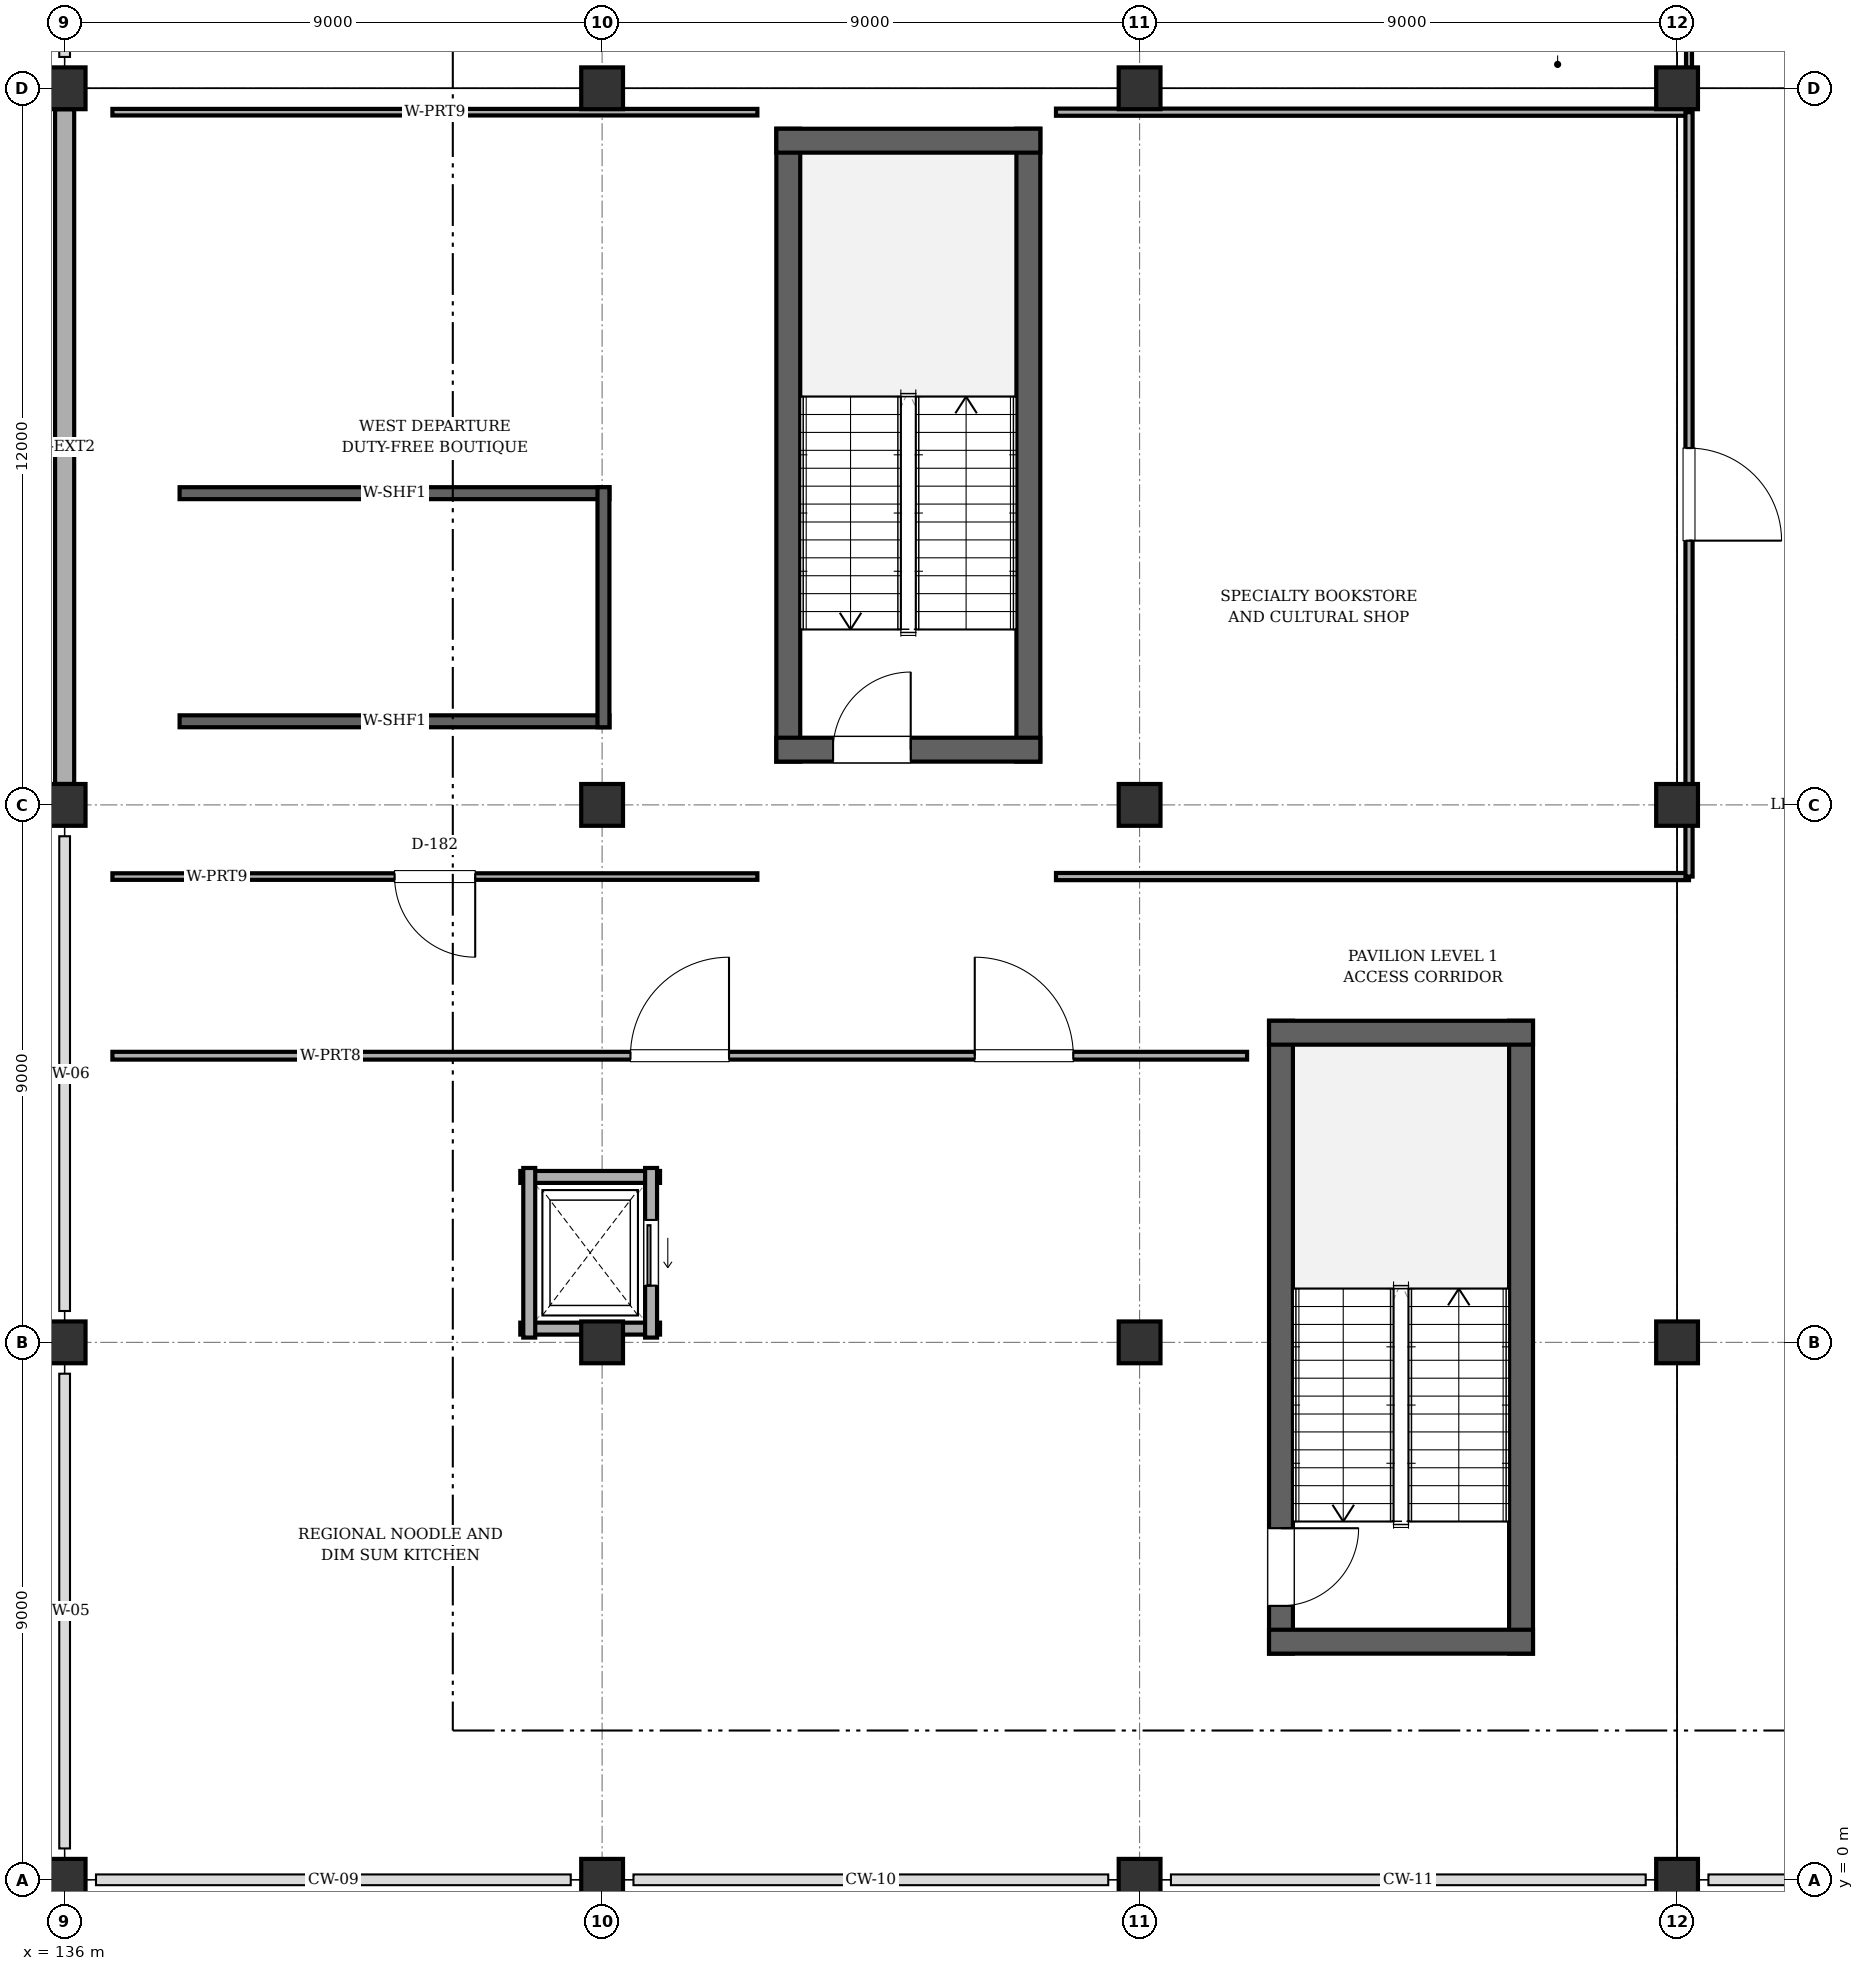
"""IFC4 building model, lengths in metres.
Left out: names, types, materials, properties, quantities, classifications, styles, units other than length and angle.
Written with IfcOpenShell. Run it as: python <this file> out.ifc"""

import sys

from ifc_helpers import new_model, si_unit, direction, frame, frame_2d, origin, origin_2d, place, context, subcontext, project, spatial, rectangle, extrude, element, fill, save


model = new_model("IFC4")
c1 = context("Model", 3, precision=1e-05, world=origin(), true_north=direction((0.0, 1.0)))
c2 = subcontext(c1, "Body", "Model", "MODEL_VIEW")
j1 = project(units=[si_unit("LENGTHUNIT", "METRE"), si_unit("PLANEANGLEUNIT", "RADIAN")], contexts=[c1])
p1 = place(None, origin())
s1 = spatial("IfcSite", under=j1, at=p1, CompositionType="ELEMENT")
p2 = place(p1, origin())
s2 = spatial("IfcBuilding", under=s1, at=p2, CompositionType="ELEMENT")
p3 = place(p2, frame((0.0, 0.0, 6.6)))
s3 = spatial("IfcBuildingStorey", under=s2, at=p3, CompositionType="ELEMENT", Elevation=6.6)
for number, where, z_axis, x_axis in (
    (1, (136.0, 0.0, 0.0), (0.0, 0.0, 1.0), (1.0, 0.0, 0.0)),
    (2, (136.0, 9.0, 0.0), (0.0, 0.0, 1.0), (1.0, 0.0, 0.0)),
    (3, (136.0, 18.0, 0.0), (0.0, 0.0, 1.0), (1.0, 0.0, 0.0)),
    (4, (136.0, 30.0, 0.0), (0.0, 0.0, 1.0), (1.0, 0.0, 0.0)),
    (5, (145.0, 0.0, 0.0), (0.0, 0.0, 1.0), (1.0, 0.0, 0.0)),
    (6, (145.0, 9.0, 0.0), (0.0, 0.0, 1.0), (1.0, 0.0, 0.0)),
    (7, (145.0, 18.0, 0.0), (0.0, 0.0, 1.0), (1.0, 0.0, 0.0)),
    (8, (145.0, 30.0, 0.0), (0.0, 0.0, 1.0), (1.0, 0.0, 0.0)),
    (9, (154.0, 0.0, 0.0), (0.0, 0.0, 1.0), (1.0, 0.0, 0.0)),
    (10, (154.0, 9.0, 0.0), (0.0, 0.0, 1.0), (1.0, 0.0, 0.0)),
    (11, (154.0, 18.0, 0.0), (0.0, 0.0, 1.0), (1.0, 0.0, 0.0)),
    (12, (154.0, 30.0, 0.0), (0.0, 0.0, 1.0), (1.0, 0.0, 0.0)),
    (13, (163.0, 0.0, 0.0), (0.0, 0.0, 1.0), (1.0, 0.0, 0.0)),
    (14, (163.0, 9.0, 0.0), (0.0, 0.0, 1.0), (1.0, 0.0, 0.0)),
    (15, (163.0, 18.0, 0.0), (0.0, 0.0, 1.0), (1.0, 0.0, 0.0)),
    (16, (163.0, 30.0, 0.0), (0.0, 0.0, 1.0), (1.0, 0.0, 0.0)),
):
    element("IfcColumn", number, at=place(p3, frame(where, z_axis=z_axis, x_axis=x_axis)), inside=s3, PredefinedType="COLUMN", context=c2, shape_type="SweptSolid", body=[
        extrude(rectangle(XDim=0.7, YDim=0.7, at=origin_2d()), origin(), (0.0, 0.0, 1.0), 4.2),
    ])
p4 = place(p3, frame((136.0, 18.35, 0.0), z_axis=(0.0, 0.0, 1.0), x_axis=(0.0, 1.0, 0.0)))
e17 = element("IfcWall", 17, at=p4, inside=s3, PredefinedType="SOLIDWALL", context=c2, shape_type="SweptSolid", body=[
    extrude(rectangle(XDim=11.3, YDim=0.32, at=frame_2d((5.65, 0.0))), origin(), (0.0, 0.0, 1.0), 3.385),
])
for number, where, z_axis, x_axis in (
    (18, (152.137, 18.725, 0.0), (0.0, 0.0, 1.0), (0.0, 1.0, 0.0)),
    (19, (148.117, 29.323, 0.0), (0.0, 0.0, 1.0), (0.0, -1.0, 0.0)),
):
    element("IfcWall", number, at=place(p3, frame(where, z_axis=z_axis, x_axis=x_axis)), inside=s3, PredefinedType="SHEAR", context=c2, shape_type="SweptSolid", body=[
        extrude(rectangle(XDim=10.597, YDim=0.4, at=frame_2d((5.299, 0.0))), origin(), (0.0, 0.0, 1.0), 3.96),
    ])
p5 = place(p3, frame((152.337, 29.123, 0.0), z_axis=(0.0, 0.0, 1.0), x_axis=(-1.0, 0.0, 0.0)))
e20 = element("IfcWall", 20, at=p5, inside=s3, PredefinedType="SHEAR", context=c2, shape_type="SweptSolid", body=[
    extrude(rectangle(XDim=4.42, YDim=0.4, at=frame_2d((2.21, 0.0))), origin(), (0.0, 0.0, 1.0), 3.96),
])
p6 = place(p3, frame((147.917, 18.925, 0.0), z_axis=(0.0, 0.0, 1.0), x_axis=(1.0, 0.0, 0.0)))
e21 = element("IfcWall", 21, at=p6, inside=s3, PredefinedType="SHEAR", context=c2, shape_type="SweptSolid", body=[
    extrude(rectangle(XDim=4.42, YDim=0.4, at=frame_2d((2.21, 0.0))), origin(), (0.0, 0.0, 1.0), 3.96),
])
p7 = place(p6, frame((0.95, 0.0, 0.0)))
e22 = element("IfcOpeningElement", 22, at=p7, cuts=e21, PredefinedType="OPENING", context=c2, shape_type="SweptSolid", body=[
    extrude(rectangle(XDim=1.3, YDim=2.1, at=frame_2d((0.65, 1.05))), frame((0.0, 0.21, 0.0), z_axis=(0.0, -1.0, 0.0), x_axis=(1.0, 0.0, 0.0)), (0.0, 0.0, 1.0), 0.42),
])
p8 = place(p3, frame((160.387, 3.788, 0.0), z_axis=(0.0, 0.0, 1.0), x_axis=(0.0, 1.0, 0.0)))
e23 = element("IfcWall", 23, at=p8, inside=s3, PredefinedType="SHEAR", context=c2, shape_type="SweptSolid", body=[
    extrude(rectangle(XDim=10.597, YDim=0.4, at=frame_2d((5.299, 0.0))), origin(), (0.0, 0.0, 1.0), 3.96),
])
p9 = place(p3, frame((156.367, 14.385, 0.0), z_axis=(0.0, 0.0, 1.0), x_axis=(0.0, -1.0, 0.0)))
e24 = element("IfcWall", 24, at=p9, inside=s3, PredefinedType="SHEAR", context=c2, shape_type="SweptSolid", body=[
    extrude(rectangle(XDim=10.597, YDim=0.4, at=frame_2d((5.299, 0.0))), origin(), (0.0, 0.0, 1.0), 3.96),
])
p10 = place(p9, frame((8.498, 0.0, 0.0)))
e25 = element("IfcOpeningElement", 25, at=p10, cuts=e24, PredefinedType="OPENING", context=c2, shape_type="SweptSolid", body=[
    extrude(rectangle(XDim=1.3, YDim=2.1, at=frame_2d((0.65, 1.05))), frame((0.0, 0.21, 0.0), z_axis=(0.0, -1.0, 0.0), x_axis=(1.0, 0.0, 0.0)), (0.0, 0.0, 1.0), 0.42),
])
for number, where, z_axis, x_axis in (
    (26, (160.587, 14.185, 0.0), (0.0, 0.0, 1.0), (-1.0, 0.0, 0.0)),
    (27, (156.167, 3.988, 0.0), (0.0, 0.0, 1.0), (1.0, 0.0, 0.0)),
):
    element("IfcWall", number, at=place(p3, frame(where, z_axis=z_axis, x_axis=x_axis)), inside=s3, PredefinedType="SHEAR", context=c2, shape_type="SweptSolid", body=[
        extrude(rectangle(XDim=4.42, YDim=0.4, at=frame_2d((2.21, 0.0))), origin(), (0.0, 0.0, 1.0), 3.96),
    ])
for number, where, z_axis, x_axis in (
    (28, (137.925, 19.4, 0.0), (0.0, 0.0, 1.0), (1.0, 0.0, 0.0)),
    (29, (145.123, 23.22, 0.0), (0.0, 0.0, 1.0), (-1.0, 0.0, 0.0)),
):
    element("IfcWall", number, at=place(p3, frame(where, z_axis=z_axis, x_axis=x_axis)), inside=s3, PredefinedType="SOLIDWALL", context=c2, shape_type="SweptSolid", body=[
        extrude(rectangle(XDim=7.198, YDim=0.2, at=frame_2d((3.599, 0.0))), origin(), (0.0, 0.0, 1.0), 3.96),
    ])
p11 = place(p3, frame((145.022, 19.3, 0.0), z_axis=(0.0, 0.0, 1.0), x_axis=(0.0, 1.0, 0.0)))
e30 = element("IfcWall", 30, at=p11, inside=s3, PredefinedType="SOLIDWALL", context=c2, shape_type="SweptSolid", body=[
    extrude(rectangle(XDim=4.02, YDim=0.2, at=frame_2d((2.01, 0.0))), origin(), (0.0, 0.0, 1.0), 3.96),
])
p12 = place(p3, frame((143.63, 9.23, 0.0), z_axis=(0.0, 0.0, 1.0), x_axis=(1.0, 0.0, 0.0)))
e31 = element("IfcWall", 31, at=p12, inside=s3, PredefinedType="SOLIDWALL", context=c2, shape_type="SweptSolid", body=[
    extrude(rectangle(XDim=2.34, YDim=0.2, at=frame_2d((1.17, 0.0))), origin(), (0.0, 0.0, 1.0), 3.495),
])
p13 = place(p3, frame((145.97, 11.77, 0.0), z_axis=(0.0, 0.0, 1.0), x_axis=(-1.0, 0.0, 0.0)))
e32 = element("IfcWall", 32, at=p13, inside=s3, PredefinedType="SOLIDWALL", context=c2, shape_type="SweptSolid", body=[
    extrude(rectangle(XDim=2.34, YDim=0.2, at=frame_2d((1.17, 0.0))), origin(), (0.0, 0.0, 1.0), 3.935),
])
p14 = place(p3, frame((143.78, 11.92, 0.0), z_axis=(0.0, 0.0, 1.0), x_axis=(0.0, -1.0, 0.0)))
e33 = element("IfcWall", 33, at=p14, inside=s3, PredefinedType="SOLIDWALL", context=c2, shape_type="SweptSolid", body=[
    extrude(rectangle(XDim=2.84, YDim=0.2, at=frame_2d((1.42, 0.0))), origin(), (0.0, 0.0, 1.0), 3.495),
])
p15 = place(p3, frame((145.82, 9.08, 0.0), z_axis=(0.0, 0.0, 1.0), x_axis=(0.0, 1.0, 0.0)))
e34 = element("IfcWall", 34, at=p15, inside=s3, PredefinedType="SOLIDWALL", context=c2, shape_type="SweptSolid", body=[
    extrude(rectangle(XDim=2.84, YDim=0.2, at=frame_2d((1.42, 0.0))), origin(), (0.0, 0.0, 1.0), 3.495),
])
p16 = place(p15, frame((0.87, 0.0, 0.0)))
e35 = element("IfcOpeningElement", 35, at=p16, cuts=e34, PredefinedType="OPENING", context=c2, shape_type="SweptSolid", body=[
    extrude(rectangle(XDim=1.1, YDim=2.15, at=frame_2d((0.55, 1.075))), frame((0.0, 0.11, 0.0), z_axis=(0.0, -1.0, 0.0), x_axis=(1.0, 0.0, 0.0)), (0.0, 0.0, 1.0), 0.22),
])
p17 = place(p3, frame((136.8, 13.8, 0.0), z_axis=(0.0, 0.0, 1.0), x_axis=(1.0, 0.0, 0.0)))
e36 = element("IfcWall", 36, at=p17, inside=s3, PredefinedType="PARTITIONING", context=c2, shape_type="SweptSolid", body=[
    extrude(rectangle(XDim=19.0, YDim=0.13, at=frame_2d((9.5, 0.0))), origin(), (0.0, 0.0, 1.0), 3.545),
])
p18 = place(p17, frame((8.675, 0.0, 0.0)))
e37 = element("IfcOpeningElement", 37, at=p18, cuts=e36, PredefinedType="OPENING", context=c2, shape_type="SweptSolid", body=[
    extrude(rectangle(XDim=1.65, YDim=2.1, at=frame_2d((0.825, 1.05))), frame((0.0, 0.075, 0.0), z_axis=(0.0, -1.0, 0.0), x_axis=(1.0, 0.0, 0.0)), (0.0, 0.0, 1.0), 0.15),
])
p19 = place(p17, frame((14.44, 0.0, 0.0)))
e38 = element("IfcOpeningElement", 38, at=p19, cuts=e36, PredefinedType="OPENING", context=c2, shape_type="SweptSolid", body=[
    extrude(rectangle(XDim=1.65, YDim=2.1, at=frame_2d((0.825, 1.05))), frame((0.0, 0.075, 0.0), z_axis=(0.0, -1.0, 0.0), x_axis=(1.0, 0.0, 0.0)), (0.0, 0.0, 1.0), 0.15),
])
p20 = place(p3, frame((163.2, 16.8, 0.0), z_axis=(0.0, 0.0, 1.0), x_axis=(-1.0, 0.0, 0.0)))
e39 = element("IfcWall", 39, at=p20, inside=s3, PredefinedType="PARTITIONING", context=c2, shape_type="SweptSolid", body=[
    extrude(rectangle(XDim=10.6, YDim=0.12, at=frame_2d((5.3, 0.0))), origin(), (0.0, 0.0, 1.0), 3.545),
])
p21 = place(p3, frame((152.6, 29.6, 0.0), z_axis=(0.0, 0.0, 1.0), x_axis=(1.0, 0.0, 0.0)))
e40 = element("IfcWall", 40, at=p21, inside=s3, PredefinedType="PARTITIONING", context=c2, shape_type="SweptSolid", body=[
    extrude(rectangle(XDim=10.6, YDim=0.12, at=frame_2d((5.3, 0.0))), origin(), (0.0, 0.0, 1.0), 3.385),
])
p22 = place(p3, frame((163.2, 29.6, 0.0), z_axis=(0.0, 0.0, 1.0), x_axis=(0.0, -1.0, 0.0)))
e41 = element("IfcWall", 41, at=p22, inside=s3, PredefinedType="PARTITIONING", context=c2, shape_type="SweptSolid", body=[
    extrude(rectangle(XDim=12.8, YDim=0.12, at=frame_2d((6.4, 0.0))), origin(), (0.0, 0.0, 1.0), 3.385),
])
p23 = place(p22, frame((5.625, 0.0, 0.0)))
e42 = element("IfcOpeningElement", 42, at=p23, cuts=e41, PredefinedType="OPENING", context=c2, shape_type="SweptSolid", body=[
    extrude(rectangle(XDim=1.55, YDim=2.1, at=frame_2d((0.775, 1.05))), frame((0.0, 0.07, 0.0), z_axis=(0.0, -1.0, 0.0), x_axis=(1.0, 0.0, 0.0)), (0.0, 0.0, 1.0), 0.14),
])
p24 = place(p3, frame((147.6, 16.8, 0.0), z_axis=(0.0, 0.0, 1.0), x_axis=(-1.0, 0.0, 0.0)))
e43 = element("IfcWall", 43, at=p24, inside=s3, PredefinedType="PARTITIONING", context=c2, shape_type="SweptSolid", body=[
    extrude(rectangle(XDim=10.8, YDim=0.11, at=frame_2d((5.4, 0.0))), origin(), (0.0, 0.0, 1.0), 3.545),
])
p25 = place(p24, frame((4.725, 0.0, 0.0)))
e44 = element("IfcOpeningElement", 44, at=p25, cuts=e43, PredefinedType="OPENING", context=c2, shape_type="SweptSolid", body=[
    extrude(rectangle(XDim=1.35, YDim=2.1, at=frame_2d((0.675, 1.05))), frame((0.0, 0.065, 0.0), z_axis=(0.0, -1.0, 0.0), x_axis=(1.0, 0.0, 0.0)), (0.0, 0.0, 1.0), 0.13),
])
p26 = place(p3, frame((136.8, 29.6, 0.0), z_axis=(0.0, 0.0, 1.0), x_axis=(1.0, 0.0, 0.0)))
e45 = element("IfcWall", 45, at=p26, inside=s3, PredefinedType="PARTITIONING", context=c2, shape_type="SweptSolid", body=[
    extrude(rectangle(XDim=10.8, YDim=0.11, at=frame_2d((5.4, 0.0))), origin(), (0.0, 0.0, 1.0), 3.385),
])
p27 = place(p3, frame((163.2, 53.4, 0.0), z_axis=(0.0, 0.0, 1.0), x_axis=(0.0, -1.0, 0.0)))
e46 = element("IfcWall", 46, at=p27, inside=s3, PredefinedType="PARTITIONING", context=c2, shape_type="SweptSolid", body=[
    extrude(rectangle(XDim=23.2, YDim=0.1, at=frame_2d((11.6, 0.0))), origin(), (0.0, 0.0, 1.0), 3.37),
])
p28 = place(p27, frame((12.375, 0.0, 0.0)))
e47 = element("IfcOpeningElement", 47, at=p28, cuts=e46, PredefinedType="OPENING", context=c2, shape_type="SweptSolid", body=[
    extrude(rectangle(XDim=1.65, YDim=2.1, at=frame_2d((0.825, 1.05))), frame((0.0, 0.06, 0.0), z_axis=(0.0, -1.0, 0.0), x_axis=(1.0, 0.0, 0.0)), (0.0, 0.0, 1.0), 0.12),
])
p29 = place(p27, frame((17.632, 0.0, 0.0)))
e48 = element("IfcOpeningElement", 48, at=p29, cuts=e46, PredefinedType="OPENING", context=c2, shape_type="SweptSolid", body=[
    extrude(rectangle(XDim=1.65, YDim=2.1, at=frame_2d((0.825, 1.05))), frame((0.0, 0.06, 0.0), z_axis=(0.0, -1.0, 0.0), x_axis=(1.0, 0.0, 0.0)), (0.0, 0.0, 1.0), 0.12),
])
p30 = place(p7, origin())
e49 = element("IfcDoor", 49, at=p30, inside=s3, OperationType="SINGLE_SWING_RIGHT", PredefinedType="DOOR", context=c2, shape_type="SweptSolid", body=[
    extrude(rectangle(XDim=1.3, YDim=2.1, at=frame_2d((0.65, 1.05))), frame((0.0, 0.025, 0.0), z_axis=(0.0, -1.0, 0.0), x_axis=(1.0, 0.0, 0.0)), (0.0, 0.0, 1.0), 0.05),
])
fill(e22, e49)
p31 = place(p10, origin())
e50 = element("IfcDoor", 50, at=p31, inside=s3, OperationType="SINGLE_SWING_LEFT", PredefinedType="DOOR", context=c2, shape_type="SweptSolid", body=[
    extrude(rectangle(XDim=1.3, YDim=2.1, at=frame_2d((0.65, 1.05))), frame((0.0, 0.025, 0.0), z_axis=(0.0, -1.0, 0.0), x_axis=(1.0, 0.0, 0.0)), (0.0, 0.0, 1.0), 0.05),
])
fill(e25, e50)
p32 = place(p16, origin())
e51 = element("IfcDoor", 51, at=p32, inside=s3, OperationType="SLIDING_TO_LEFT", PredefinedType="DOOR", context=c2, shape_type="SweptSolid", body=[
    extrude(rectangle(XDim=1.1, YDim=2.15, at=frame_2d((0.55, 1.075))), frame((0.0, 0.025, 0.0), z_axis=(0.0, -1.0, 0.0), x_axis=(1.0, 0.0, 0.0)), (0.0, 0.0, 1.0), 0.05),
])
fill(e35, e51)
p33 = place(p18, origin())
e52 = element("IfcDoor", 52, at=p33, inside=s3, OperationType="SINGLE_SWING_RIGHT", PredefinedType="DOOR", context=c2, shape_type="SweptSolid", body=[
    extrude(rectangle(XDim=1.65, YDim=2.1, at=frame_2d((0.825, 1.05))), frame((0.0, 0.025, 0.0), z_axis=(0.0, -1.0, 0.0), x_axis=(1.0, 0.0, 0.0)), (0.0, 0.0, 1.0), 0.05),
])
fill(e37, e52)
p34 = place(p19, origin())
e53 = element("IfcDoor", 53, at=p34, inside=s3, OperationType="SINGLE_SWING_LEFT", PredefinedType="DOOR", context=c2, shape_type="SweptSolid", body=[
    extrude(rectangle(XDim=1.65, YDim=2.1, at=frame_2d((0.825, 1.05))), frame((0.0, 0.025, 0.0), z_axis=(0.0, -1.0, 0.0), x_axis=(1.0, 0.0, 0.0)), (0.0, 0.0, 1.0), 0.05),
])
fill(e38, e53)
p35 = place(p23, origin())
e54 = element("IfcDoor", 54, at=p35, inside=s3, OperationType="SINGLE_SWING_RIGHT", PredefinedType="DOOR", context=c2, shape_type="SweptSolid", body=[
    extrude(rectangle(XDim=1.55, YDim=2.1, at=frame_2d((0.775, 1.05))), frame((0.0, 0.025, 0.0), z_axis=(0.0, -1.0, 0.0), x_axis=(1.0, 0.0, 0.0)), (0.0, 0.0, 1.0), 0.05),
])
fill(e42, e54)
p36 = place(p25, origin())
e55 = element("IfcDoor", 55, at=p36, inside=s3, OperationType="SINGLE_SWING_LEFT", PredefinedType="DOOR", context=c2, shape_type="SweptSolid", body=[
    extrude(rectangle(XDim=1.35, YDim=2.1, at=frame_2d((0.675, 1.05))), frame((0.0, 0.025, 0.0), z_axis=(0.0, -1.0, 0.0), x_axis=(1.0, 0.0, 0.0)), (0.0, 0.0, 1.0), 0.05),
])
fill(e44, e55)
save(model, sys.argv[1])
